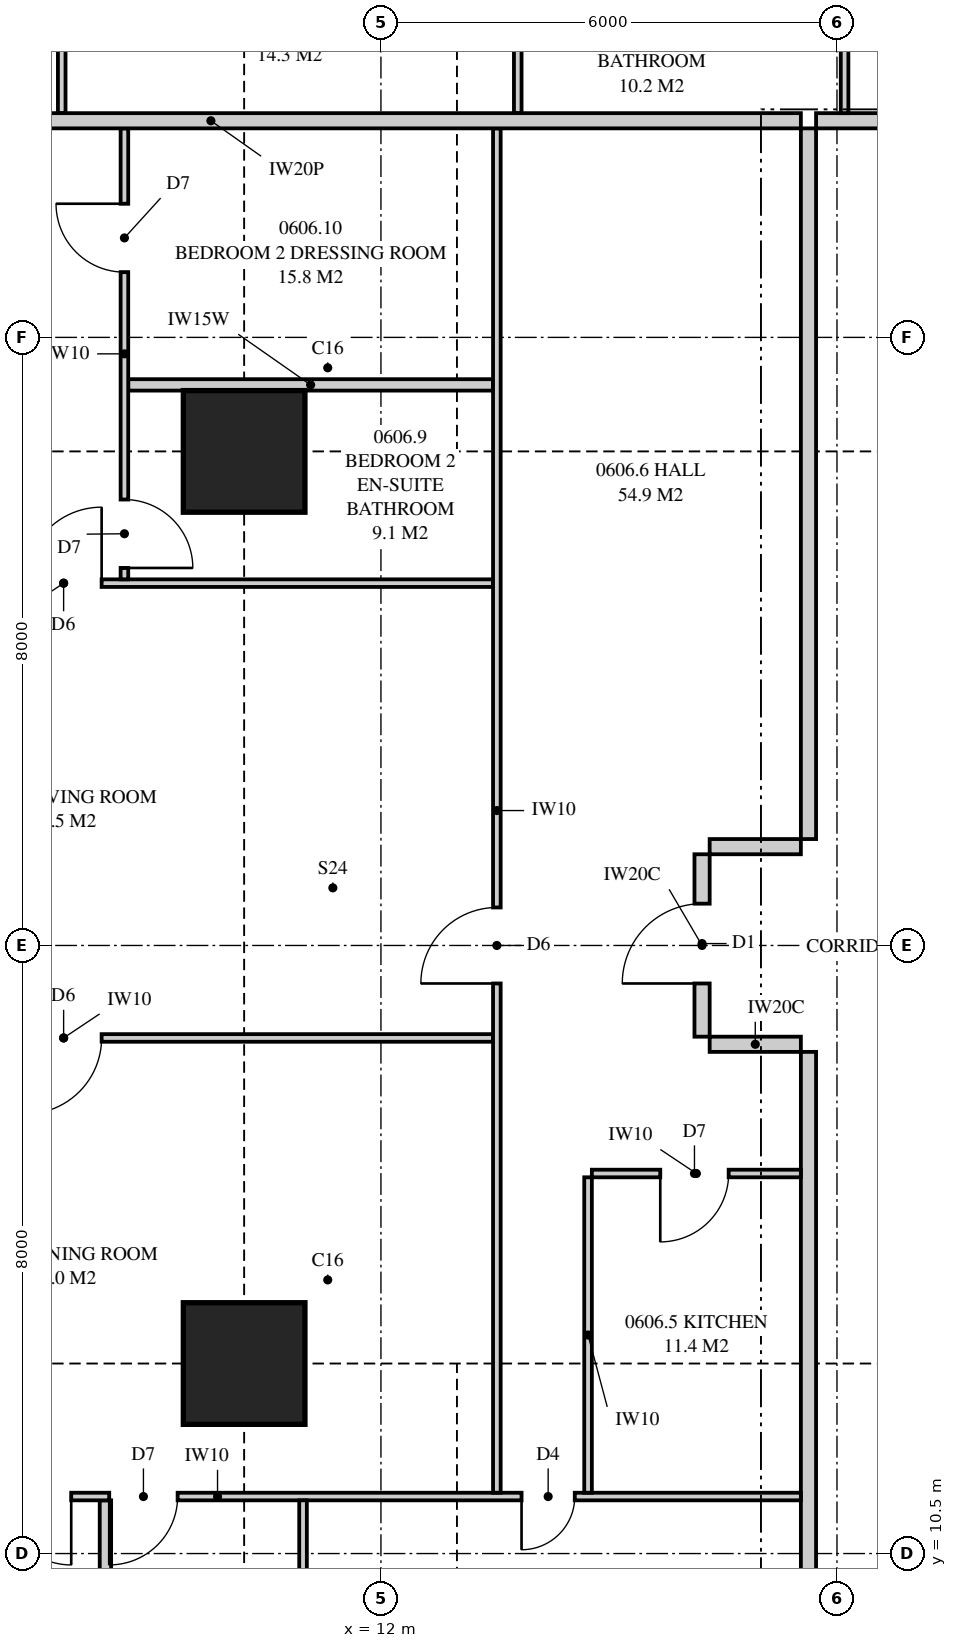
"""IFC4 building model, lengths in metres.
Left out: names, types, materials, properties, quantities, classifications, styles, units other than length and angle.
Written with IfcOpenShell. Run it as: python <this file> out.ifc"""

import sys

from ifc_helpers import new_model, si_unit, direction, frame, frame_2d, origin, origin_2d, place, context, subcontext, project, spatial, polyline, rectangle, outline, extrude, element, fill, save


model = new_model("IFC4")
c1 = context("Model", 3, precision=1e-05, world=origin(), true_north=direction((0.0, 1.0)))
c2 = subcontext(c1, "Body", "Model", "MODEL_VIEW")
j1 = project(units=[si_unit("LENGTHUNIT", "METRE"), si_unit("PLANEANGLEUNIT", "RADIAN")], contexts=[c1])
p1 = place(None, origin())
s1 = spatial("IfcSite", under=j1, at=p1, CompositionType="ELEMENT")
p2 = place(p1, origin())
s2 = spatial("IfcBuilding", under=s1, at=p2, CompositionType="ELEMENT")
p3 = place(p2, frame((0.0, 0.0, 27.7)))
s3 = spatial("IfcBuildingStorey", under=s2, at=p3, CompositionType="ELEMENT", Elevation=27.7)
for number, where, z_axis, x_axis in (
    (1, (10.2, 13.0, 0.0), (0.0, 0.0, 1.0), (1.0, 0.0, 0.0)),
    (2, (10.2, 25.0, 0.0), (0.0, 0.0, 1.0), (1.0, 0.0, 0.0)),
):
    element("IfcColumn", number, at=place(p3, frame(where, z_axis=z_axis, x_axis=x_axis)), inside=s3, PredefinedType="COLUMN", context=c2, shape_type="SweptSolid", body=[
        extrude(rectangle(XDim=1.6, YDim=1.6, at=origin_2d()), origin(), (0.0, 0.0, 1.0), 3.35),
    ])
p4 = place(p3, frame((17.725, 29.35, 0.0), z_axis=(0.0, 0.0, 1.0), x_axis=(1.0, 0.0, 0.0)))
e3 = element("IfcWall", 3, at=p4, inside=s3, PredefinedType="PARTITIONING", context=c2, shape_type="SweptSolid", body=[
    extrude(rectangle(XDim=3.525, YDim=0.2, at=frame_2d((1.762, 0.0))), origin(), (0.0, 0.0, 1.0), 3.11),
])
p5 = place(p3, frame((7.8, 37.825, 0.0), z_axis=(0.0, 0.0, 1.0), x_axis=(0.0, -1.0, 0.0)))
e4 = element("IfcWall", 4, at=p5, inside=s3, PredefinedType="PARTITIONING", context=c2, shape_type="SweptSolid", body=[
    extrude(outline(polyline([(0.0, 0.0), (8.375, 0.0), (8.375, 3.11), (2.697, 3.11), (2.697, 2.15), (0.943, 2.15), (0.943, 3.11), (0.0, 3.11), (0.0, 0.0)])), frame((0.0, 0.05, 0.0), z_axis=(0.0, -1.0, 0.0), x_axis=(1.0, 0.0, 0.0)), (0.0, 0.0, 1.0), 0.1),
])
p6 = place(p5, frame((2.842, 0.0, 0.0)))
e5 = element("IfcOpeningElement", 5, at=p6, cuts=e4, PredefinedType="OPENING", context=c2, shape_type="SweptSolid", body=[
    extrude(rectangle(XDim=0.9, YDim=2.1, at=frame_2d((0.45, 1.05))), frame((0.0, 0.06, 0.0), z_axis=(0.0, -1.0, 0.0), x_axis=(1.0, 0.0, 0.0)), (0.0, 0.0, 1.0), 0.12),
])
p7 = place(p5, frame((6.059, 0.0, 0.0)))
e6 = element("IfcOpeningElement", 6, at=p7, cuts=e4, PredefinedType="OPENING", context=c2, shape_type="SweptSolid", body=[
    extrude(rectangle(XDim=0.9, YDim=2.1, at=frame_2d((0.45, 1.05))), frame((0.0, 0.06, 0.0), z_axis=(0.0, -1.0, 0.0), x_axis=(1.0, 0.0, 0.0)), (0.0, 0.0, 1.0), 0.12),
])
p8 = place(p3, frame((13.8, 37.825, 0.0), z_axis=(0.0, 0.0, 1.0), x_axis=(0.0, -1.0, 0.0)))
e7 = element("IfcWall", 7, at=p8, inside=s3, PredefinedType="PARTITIONING", context=c2, shape_type="SweptSolid", body=[
    extrude(outline(polyline([(1.635, 2.15), (0.0, 2.15), (0.0, 0.0), (8.375, 0.0), (8.375, 3.11), (1.635, 3.11), (1.635, 2.15)]), holes=[polyline([(1.021, 0.126), (0.529, 0.126), (0.529, 0.919), (1.021, 0.919), (1.021, 0.126)]), polyline([(1.021, 1.231), (0.529, 1.231), (0.529, 2.024), (1.021, 2.024), (1.021, 1.231)])]), frame((0.0, 0.05, 0.0), z_axis=(0.0, -1.0, 0.0), x_axis=(1.0, 0.0, 0.0)), (0.0, 0.0, 1.0), 0.1),
])
p9 = place(p8, frame((4.525, 0.0, 0.0)))
e8 = element("IfcOpeningElement", 8, at=p9, cuts=e7, PredefinedType="OPENING", context=c2, shape_type="SweptSolid", body=[
    extrude(rectangle(XDim=0.9, YDim=2.1, at=frame_2d((0.45, 1.05))), frame((0.0, 0.06, 0.0), z_axis=(0.0, -1.0, 0.0), x_axis=(1.0, 0.0, 0.0)), (0.0, 0.0, 1.0), 0.12),
])
p10 = place(p3, frame((18.1, 37.825, 0.0), z_axis=(0.0, 0.0, 1.0), x_axis=(0.0, -1.0, 0.0)))
e9 = element("IfcWall", 9, at=p10, inside=s3, PredefinedType="PARTITIONING", context=c2, shape_type="SweptSolid", body=[
    extrude(outline(polyline([(0.0, 0.0), (8.375, 0.0), (8.375, 3.11), (1.635, 3.11), (1.635, 2.15), (0.0, 2.15), (0.0, 3.11), (0.0, 0.0)])), frame((0.0, 0.05, 0.0), z_axis=(0.0, -1.0, 0.0), x_axis=(1.0, 0.0, 0.0)), (0.0, 0.0, 1.0), 0.1),
])
p11 = place(p10, frame((4.525, 0.0, 0.0)))
e10 = element("IfcOpeningElement", 10, at=p11, cuts=e9, PredefinedType="OPENING", context=c2, shape_type="SweptSolid", body=[
    extrude(rectangle(XDim=0.9, YDim=2.1, at=frame_2d((0.45, 1.05))), frame((0.0, 0.06, 0.0), z_axis=(0.0, -1.0, 0.0), x_axis=(1.0, 0.0, 0.0)), (0.0, 0.0, 1.0), 0.12),
])
p12 = place(p3, frame((2.0, 29.35, 0.0), z_axis=(0.0, 0.0, 1.0), x_axis=(1.0, 0.0, 0.0)))
e11 = element("IfcWall", 11, at=p12, inside=s3, PredefinedType="PARTITIONING", context=c2, shape_type="SweptSolid", body=[
    extrude(outline(polyline([(0.0, 0.0), (15.525, 0.0), (15.525, 3.11), (11.337, 3.11), (11.337, 2.541), (10.663, 2.541), (10.663, 3.11), (9.51, 3.11), (9.51, 2.51), (6.89, 2.51), (6.89, 3.11), (2.969, 3.11), (2.969, 2.541), (2.577, 2.541), (2.577, 2.15), (0.733, 2.15), (0.733, 3.11), (0.0, 3.11), (0.0, 0.0)])), frame((0.0, 0.1, 0.0), z_axis=(0.0, -1.0, 0.0), x_axis=(1.0, 0.0, 0.0)), (0.0, 0.0, 1.0), 0.2),
])
p13 = place(p3, frame((17.625, 7.75, 0.0), z_axis=(0.0, 0.0, 1.0), x_axis=(0.0, 1.0, 0.0)))
e12 = element("IfcWall", 12, at=p13, inside=s3, PredefinedType="PARTITIONING", context=c2, shape_type="SweptSolid", body=[
    extrude(outline(polyline([(0.0, 0.0), (9.35, 0.0), (9.35, 3.11), (5.587, 3.11), (5.587, 2.541), (4.913, 2.541), (4.913, 3.11), (0.0, 3.11), (0.0, 0.0)])), frame((0.0, 0.1, 0.0), z_axis=(0.0, -1.0, 0.0), x_axis=(1.0, 0.0, 0.0)), (0.0, 0.0, 1.0), 0.2),
])
p14 = place(p3, frame((2.175, 11.25, 0.0), z_axis=(0.0, 0.0, 1.0), x_axis=(1.0, 0.0, 0.0)))
e13 = element("IfcWall", 13, at=p14, inside=s3, PredefinedType="PARTITIONING", context=c2, shape_type="SweptSolid", body=[
    extrude(outline(polyline([(0.188, 3.11), (0.0, 3.11), (0.0, 0.0), (0.529, 0.0), (0.529, 0.263), (1.021, 0.263), (1.021, 0.0), (15.35, 0.0), (15.35, 3.11), (11.112, 3.11), (11.112, 2.541), (10.538, 2.541), (10.538, 3.11), (9.285, 3.11), (9.285, 2.51), (6.765, 2.51), (6.765, 3.11), (2.744, 3.11), (2.744, 2.541), (2.169, 2.541), (2.169, 3.11), (1.93, 3.11), (1.93, 2.15), (1.021, 2.15), (1.021, 1.887), (0.529, 1.887), (0.529, 2.15), (0.188, 2.15), (0.188, 3.11)])), frame((0.0, 0.05, 0.0), z_axis=(0.0, -1.0, 0.0), x_axis=(1.0, 0.0, 0.0)), (0.0, 0.0, 1.0), 0.1),
])
p15 = place(p14, frame((4.85, 0.0, 0.0)))
e14 = element("IfcOpeningElement", 14, at=p15, cuts=e13, PredefinedType="OPENING", context=c2, shape_type="SweptSolid", body=[
    extrude(rectangle(XDim=0.9, YDim=2.1, at=frame_2d((0.45, 1.05))), frame((0.0, 0.06, 0.0), z_axis=(0.0, -1.0, 0.0), x_axis=(1.0, 0.0, 0.0)), (0.0, 0.0, 1.0), 0.12),
])
p16 = place(p14, frame((6.25, 0.0, 0.0)))
e15 = element("IfcOpeningElement", 15, at=p16, cuts=e13, PredefinedType="OPENING", context=c2, shape_type="SweptSolid", body=[
    extrude(rectangle(XDim=0.9, YDim=2.1, at=frame_2d((0.45, 1.05))), frame((0.0, 0.06, 0.0), z_axis=(0.0, -1.0, 0.0), x_axis=(1.0, 0.0, 0.0)), (0.0, 0.0, 1.0), 0.12),
])
p17 = place(p14, frame((11.675, 0.0, 0.0)))
e16 = element("IfcOpeningElement", 16, at=p17, cuts=e13, PredefinedType="OPENING", context=c2, shape_type="SweptSolid", body=[
    extrude(rectangle(XDim=0.7, YDim=2.1, at=frame_2d((0.35, 1.05))), frame((0.0, 0.06, 0.0), z_axis=(0.0, -1.0, 0.0), x_axis=(1.0, 0.0, 0.0)), (0.0, 0.0, 1.0), 0.12),
])
p18 = place(p3, frame((8.375, 7.75, 0.0), z_axis=(0.0, 0.0, 1.0), x_axis=(0.0, 1.0, 0.0)))
e17 = element("IfcWall", 17, at=p18, inside=s3, PredefinedType="PLUMBINGWALL", context=c2, shape_type="SweptSolid", body=[
    extrude(rectangle(XDim=3.45, YDim=0.15, at=frame_2d((1.725, 0.0))), origin(), (0.0, 0.0, 1.0), 3.11),
])
p19 = place(p3, frame((10.975, 7.75, 0.0), z_axis=(0.0, 0.0, 1.0), x_axis=(0.0, 1.0, 0.0)))
e18 = element("IfcWall", 18, at=p19, inside=s3, PredefinedType="PARTITIONING", context=c2, shape_type="SweptSolid", body=[
    extrude(outline(polyline([(0.0, 0.0), (3.45, 0.0), (3.45, 3.11), (3.45, 2.51), (0.0, 2.51), (0.0, 3.11), (0.0, 0.0)])), frame((0.0, 0.05, 0.0), z_axis=(0.0, -1.0, 0.0), x_axis=(1.0, 0.0, 0.0)), (0.0, 0.0, 1.0), 0.1),
])
p20 = place(p3, frame((13.525, 11.3, 0.0), z_axis=(0.0, 0.0, 1.0), x_axis=(0.0, 1.0, 0.0)))
e19 = element("IfcWall", 19, at=p20, inside=s3, PredefinedType="PARTITIONING", context=c2, shape_type="SweptSolid", body=[
    extrude(outline(polyline([(0.0, 0.0), (17.95, 0.0), (17.95, 3.11), (13.987, 3.11), (13.987, 2.541), (13.413, 2.541), (13.413, 3.11), (1.987, 3.11), (1.987, 2.541), (1.413, 2.541), (1.413, 3.11), (0.0, 3.11), (0.0, 0.0)])), frame((0.0, 0.05, 0.0), z_axis=(0.0, -1.0, 0.0), x_axis=(1.0, 0.0, 0.0)), (0.0, 0.0, 1.0), 0.1),
])
p21 = place(p20, frame((6.7, 0.0, 0.0)))
e20 = element("IfcOpeningElement", 20, at=p21, cuts=e19, PredefinedType="OPENING", context=c2, shape_type="SweptSolid", body=[
    extrude(rectangle(XDim=1.0, YDim=2.1, at=frame_2d((0.5, 1.05))), frame((0.0, 0.06, 0.0), z_axis=(0.0, -1.0, 0.0), x_axis=(1.0, 0.0, 0.0)), (0.0, 0.0, 1.0), 0.12),
])
p22 = place(p3, frame((14.725, 11.3, 0.0), z_axis=(0.0, 0.0, 1.0), x_axis=(0.0, 1.0, 0.0)))
e21 = element("IfcWall", 21, at=p22, inside=s3, PredefinedType="PARTITIONING", context=c2, shape_type="SweptSolid", body=[
    extrude(outline(polyline([(0.0, 0.0), (4.15, 0.0), (4.15, 3.11), (1.987, 3.11), (1.987, 2.541), (1.413, 2.541), (1.413, 3.11), (0.0, 3.11), (0.0, 0.0)])), frame((0.0, 0.05, 0.0), z_axis=(0.0, -1.0, 0.0), x_axis=(1.0, 0.0, 0.0)), (0.0, 0.0, 1.0), 0.1),
])
p23 = place(p3, frame((14.775, 15.5, 0.0), z_axis=(0.0, 0.0, 1.0), x_axis=(1.0, 0.0, 0.0)))
e22 = element("IfcWall", 22, at=p23, inside=s3, PredefinedType="PARTITIONING", context=c2, shape_type="SweptSolid", body=[
    extrude(rectangle(XDim=2.75, YDim=0.1, at=frame_2d((1.375, 0.0))), origin(), (0.0, 0.0, 1.0), 3.11),
])
p24 = place(p23, frame((0.9, 0.0, 0.0)))
e23 = element("IfcOpeningElement", 23, at=p24, cuts=e22, PredefinedType="OPENING", context=c2, shape_type="SweptSolid", body=[
    extrude(rectangle(XDim=0.9, YDim=2.1, at=frame_2d((0.45, 1.05))), frame((0.0, 0.06, 0.0), z_axis=(0.0, -1.0, 0.0), x_axis=(1.0, 0.0, 0.0)), (0.0, 0.0, 1.0), 0.12),
])
p25 = place(p3, frame((2.175, 17.283, 0.0), z_axis=(0.0, 0.0, 1.0), x_axis=(1.0, 0.0, 0.0)))
e24 = element("IfcWall", 24, at=p25, inside=s3, PredefinedType="PARTITIONING", context=c2, shape_type="SweptSolid", body=[
    extrude(outline(polyline([(0.0, 0.0), (11.3, 0.0), (11.3, 3.11), (9.285, 3.11), (9.285, 2.51), (6.765, 2.51), (6.765, 3.11), (1.635, 3.11), (1.635, 2.15), (0.0, 2.15), (0.0, 3.11), (0.0, 0.0)])), frame((0.0, 0.05, 0.0), z_axis=(0.0, -1.0, 0.0), x_axis=(1.0, 0.0, 0.0)), (0.0, 0.0, 1.0), 0.1),
])
p26 = place(p25, frame((5.15, 0.0, 0.0)))
e25 = element("IfcOpeningElement", 25, at=p26, cuts=e24, PredefinedType="OPENING", context=c2, shape_type="SweptSolid", body=[
    extrude(rectangle(XDim=1.0, YDim=2.1, at=frame_2d((0.5, 1.05))), frame((0.0, 0.06, 0.0), z_axis=(0.0, -1.0, 0.0), x_axis=(1.0, 0.0, 0.0)), (0.0, 0.0, 1.0), 0.12),
])
p27 = place(p3, frame((2.175, 23.267, 0.0), z_axis=(0.0, 0.0, 1.0), x_axis=(1.0, 0.0, 0.0)))
e26 = element("IfcWall", 26, at=p27, inside=s3, PredefinedType="PARTITIONING", context=c2, shape_type="SweptSolid", body=[
    extrude(outline(polyline([(0.529, 2.15), (0.0, 2.15), (0.0, 0.0), (0.529, 0.0), (0.529, 0.274), (1.021, 0.274), (1.021, 0.0), (11.3, 0.0), (11.3, 3.11), (9.285, 3.11), (9.285, 2.51), (6.765, 2.51), (6.765, 3.11), (1.635, 3.11), (1.635, 2.15), (1.021, 2.15), (1.021, 1.876), (0.529, 1.876), (0.529, 2.15)])), frame((0.0, 0.05, 0.0), z_axis=(0.0, -1.0, 0.0), x_axis=(1.0, 0.0, 0.0)), (0.0, 0.0, 1.0), 0.1),
])
p28 = place(p27, frame((5.15, 0.0, 0.0)))
e27 = element("IfcOpeningElement", 27, at=p28, cuts=e26, PredefinedType="OPENING", context=c2, shape_type="SweptSolid", body=[
    extrude(rectangle(XDim=1.0, YDim=2.1, at=frame_2d((0.5, 1.05))), frame((0.0, 0.06, 0.0), z_axis=(0.0, -1.0, 0.0), x_axis=(1.0, 0.0, 0.0)), (0.0, 0.0, 1.0), 0.12),
])
p29 = place(p3, frame((17.625, 19.9, 0.0), z_axis=(0.0, 0.0, 1.0), x_axis=(0.0, 1.0, 0.0)))
e28 = element("IfcWall", 28, at=p29, inside=s3, PredefinedType="PARTITIONING", context=c2, shape_type="SweptSolid", body=[
    extrude(outline(polyline([(0.0, 0.0), (9.35, 0.0), (9.35, 3.11), (5.437, 3.11), (5.437, 2.541), (4.763, 2.541), (4.763, 3.11), (0.0, 3.11), (0.0, 0.0)])), frame((0.0, 0.1, 0.0), z_axis=(0.0, -1.0, 0.0), x_axis=(1.0, 0.0, 0.0)), (0.0, 0.0, 1.0), 0.2),
])
p30 = place(p3, frame((16.225, 17.3, 0.0), z_axis=(0.0, 0.0, 1.0), x_axis=(0.0, 1.0, 0.0)))
e29 = element("IfcWall", 29, at=p30, inside=s3, PredefinedType="PARTITIONING", context=c2, shape_type="SweptSolid", body=[
    extrude(rectangle(XDim=2.4, YDim=0.2, at=frame_2d((1.2, 0.0))), origin(), (0.0, 0.0, 1.0), 3.11),
])
p31 = place(p30, frame((0.7, 0.0, 0.0)))
e30 = element("IfcOpeningElement", 30, at=p31, cuts=e29, PredefinedType="OPENING", context=c2, shape_type="SweptSolid", body=[
    extrude(rectangle(XDim=1.05, YDim=2.2, at=frame_2d((0.525, 1.1))), frame((0.0, 0.11, 0.0), z_axis=(0.0, -1.0, 0.0), x_axis=(1.0, 0.0, 0.0)), (0.0, 0.0, 1.0), 0.22),
])
for number, where, z_axis, x_axis in (
    (31, (17.525, 17.2, 0.0), (0.0, 0.0, 1.0), (-1.0, 0.0, 0.0)),
    (32, (17.525, 19.8, 0.0), (0.0, 0.0, 1.0), (-1.0, 0.0, 0.0)),
):
    element("IfcWall", number, at=place(p3, frame(where, z_axis=z_axis, x_axis=x_axis)), inside=s3, PredefinedType="PARTITIONING", context=c2, shape_type="SweptSolid", body=[
        extrude(rectangle(XDim=1.2, YDim=0.2, at=frame_2d((0.6, 0.0))), origin(), (0.0, 0.0, 1.0), 3.11),
    ])
p32 = place(p3, frame((8.625, 23.317, 0.0), z_axis=(0.0, 0.0, 1.0), x_axis=(0.0, 1.0, 0.0)))
e33 = element("IfcWall", 33, at=p32, inside=s3, PredefinedType="PARTITIONING", context=c2, shape_type="SweptSolid", body=[
    extrude(outline(polyline([(0.0, 0.0), (5.933, 0.0), (5.933, 3.11), (1.971, 3.11), (1.971, 2.541), (1.396, 2.541), (1.396, 3.11), (0.0, 3.11), (0.0, 0.0)])), frame((0.0, 0.05, 0.0), z_axis=(0.0, -1.0, 0.0), x_axis=(1.0, 0.0, 0.0)), (0.0, 0.0, 1.0), 0.1),
])
p33 = place(p32, frame((0.15, 0.0, 0.0)))
e34 = element("IfcOpeningElement", 34, at=p33, cuts=e33, PredefinedType="OPENING", context=c2, shape_type="SweptSolid", body=[
    extrude(rectangle(XDim=0.9, YDim=2.1, at=frame_2d((0.45, 1.05))), frame((0.0, 0.06, 0.0), z_axis=(0.0, -1.0, 0.0), x_axis=(1.0, 0.0, 0.0)), (0.0, 0.0, 1.0), 0.12),
])
p34 = place(p32, frame((4.042, 0.0, 0.0)))
e35 = element("IfcOpeningElement", 35, at=p34, cuts=e33, PredefinedType="OPENING", context=c2, shape_type="SweptSolid", body=[
    extrude(rectangle(XDim=0.9, YDim=2.1, at=frame_2d((0.45, 1.05))), frame((0.0, 0.06, 0.0), z_axis=(0.0, -1.0, 0.0), x_axis=(1.0, 0.0, 0.0)), (0.0, 0.0, 1.0), 0.12),
])
p35 = place(p3, frame((8.675, 25.875, 0.0), z_axis=(0.0, 0.0, 1.0), x_axis=(1.0, 0.0, 0.0)))
e36 = element("IfcWall", 36, at=p35, inside=s3, PredefinedType="PLUMBINGWALL", context=c2, shape_type="SweptSolid", body=[
    extrude(outline(polyline([(0.0, 0.0), (4.8, 0.0), (4.8, 3.11), (4.637, 3.11), (4.637, 2.541), (4.013, 2.541), (4.013, 3.11), (2.81, 3.11), (2.81, 2.51), (0.24, 2.51), (0.24, 3.11), (0.0, 3.11), (0.0, 0.0)])), frame((0.0, 0.075, 0.0), z_axis=(0.0, -1.0, 0.0), x_axis=(1.0, 0.0, 0.0)), (0.0, 0.0, 1.0), 0.15),
])
p36 = place(p31, origin())
e37 = element("IfcDoor", 37, at=p36, inside=s3, OperationType="SINGLE_SWING_LEFT", PredefinedType="DOOR", context=c2, shape_type="SweptSolid", body=[
    extrude(rectangle(XDim=1.05, YDim=2.2, at=frame_2d((0.525, 1.1))), frame((0.0, 0.025, 0.0), z_axis=(0.0, -1.0, 0.0), x_axis=(1.0, 0.0, 0.0)), (0.0, 0.0, 1.0), 0.05),
])
fill(e30, e37)
p37 = place(p15, frame((0.9, 0.0, 0.0), z_axis=(0.0, 0.0, 1.0), x_axis=(-1.0, 0.0, 0.0)))
e38 = element("IfcDoor", 38, at=p37, inside=s3, OperationType="SINGLE_SWING_LEFT", PredefinedType="DOOR", context=c2, shape_type="SweptSolid", body=[
    extrude(rectangle(XDim=0.9, YDim=2.1, at=frame_2d((0.45, 1.05))), frame((0.0, 0.025, 0.0), z_axis=(0.0, -1.0, 0.0), x_axis=(1.0, 0.0, 0.0)), (0.0, 0.0, 1.0), 0.05),
])
fill(e14, e38)
p38 = place(p16, frame((0.9, 0.0, 0.0), z_axis=(0.0, 0.0, 1.0), x_axis=(-1.0, 0.0, 0.0)))
e39 = element("IfcDoor", 39, at=p38, inside=s3, OperationType="SINGLE_SWING_RIGHT", PredefinedType="DOOR", context=c2, shape_type="SweptSolid", body=[
    extrude(rectangle(XDim=0.9, YDim=2.1, at=frame_2d((0.45, 1.05))), frame((0.0, 0.025, 0.0), z_axis=(0.0, -1.0, 0.0), x_axis=(1.0, 0.0, 0.0)), (0.0, 0.0, 1.0), 0.05),
])
fill(e15, e39)
p39 = place(p17, frame((0.7, 0.0, 0.0), z_axis=(0.0, 0.0, 1.0), x_axis=(-1.0, 0.0, 0.0)))
e40 = element("IfcDoor", 40, at=p39, inside=s3, OperationType="SINGLE_SWING_RIGHT", PredefinedType="DOOR", context=c2, shape_type="SweptSolid", body=[
    extrude(rectangle(XDim=0.7, YDim=2.1, at=frame_2d((0.35, 1.05))), frame((0.0, 0.025, 0.0), z_axis=(0.0, -1.0, 0.0), x_axis=(1.0, 0.0, 0.0)), (0.0, 0.0, 1.0), 0.05),
])
fill(e16, e40)
p40 = place(p24, frame((0.9, 0.0, 0.0), z_axis=(0.0, 0.0, 1.0), x_axis=(-1.0, 0.0, 0.0)))
e41 = element("IfcDoor", 41, at=p40, inside=s3, OperationType="SINGLE_SWING_RIGHT", PredefinedType="DOOR", context=c2, shape_type="SweptSolid", body=[
    extrude(rectangle(XDim=0.9, YDim=2.1, at=frame_2d((0.45, 1.05))), frame((0.0, 0.025, 0.0), z_axis=(0.0, -1.0, 0.0), x_axis=(1.0, 0.0, 0.0)), (0.0, 0.0, 1.0), 0.05),
])
fill(e23, e41)
p41 = place(p21, origin())
e42 = element("IfcDoor", 42, at=p41, inside=s3, OperationType="SINGLE_SWING_LEFT", PredefinedType="DOOR", context=c2, shape_type="SweptSolid", body=[
    extrude(rectangle(XDim=1.0, YDim=2.1, at=frame_2d((0.5, 1.05))), frame((0.0, 0.025, 0.0), z_axis=(0.0, -1.0, 0.0), x_axis=(1.0, 0.0, 0.0)), (0.0, 0.0, 1.0), 0.05),
])
fill(e20, e42)
p42 = place(p26, frame((1.0, 0.0, 0.0), z_axis=(0.0, 0.0, 1.0), x_axis=(-1.0, 0.0, 0.0)))
e43 = element("IfcDoor", 43, at=p42, inside=s3, OperationType="SINGLE_SWING_RIGHT", PredefinedType="DOOR", context=c2, shape_type="SweptSolid", body=[
    extrude(rectangle(XDim=1.0, YDim=2.1, at=frame_2d((0.5, 1.05))), frame((0.0, 0.025, 0.0), z_axis=(0.0, -1.0, 0.0), x_axis=(1.0, 0.0, 0.0)), (0.0, 0.0, 1.0), 0.05),
])
fill(e25, e43)
p43 = place(p28, origin())
e44 = element("IfcDoor", 44, at=p43, inside=s3, OperationType="SINGLE_SWING_RIGHT", PredefinedType="DOOR", context=c2, shape_type="SweptSolid", body=[
    extrude(rectangle(XDim=1.0, YDim=2.1, at=frame_2d((0.5, 1.05))), frame((0.0, 0.025, 0.0), z_axis=(0.0, -1.0, 0.0), x_axis=(1.0, 0.0, 0.0)), (0.0, 0.0, 1.0), 0.05),
])
fill(e27, e44)
p44 = place(p33, frame((0.9, 0.0, 0.0), z_axis=(0.0, 0.0, 1.0), x_axis=(-1.0, 0.0, 0.0)))
e45 = element("IfcDoor", 45, at=p44, inside=s3, OperationType="SINGLE_SWING_RIGHT", PredefinedType="DOOR", context=c2, shape_type="SweptSolid", body=[
    extrude(rectangle(XDim=0.9, YDim=2.1, at=frame_2d((0.45, 1.05))), frame((0.0, 0.025, 0.0), z_axis=(0.0, -1.0, 0.0), x_axis=(1.0, 0.0, 0.0)), (0.0, 0.0, 1.0), 0.05),
])
fill(e34, e45)
p45 = place(p34, origin())
e46 = element("IfcDoor", 46, at=p45, inside=s3, OperationType="SINGLE_SWING_RIGHT", PredefinedType="DOOR", context=c2, shape_type="SweptSolid", body=[
    extrude(rectangle(XDim=0.9, YDim=2.1, at=frame_2d((0.45, 1.05))), frame((0.0, 0.025, 0.0), z_axis=(0.0, -1.0, 0.0), x_axis=(1.0, 0.0, 0.0)), (0.0, 0.0, 1.0), 0.05),
])
fill(e35, e46)
save(model, sys.argv[1])
